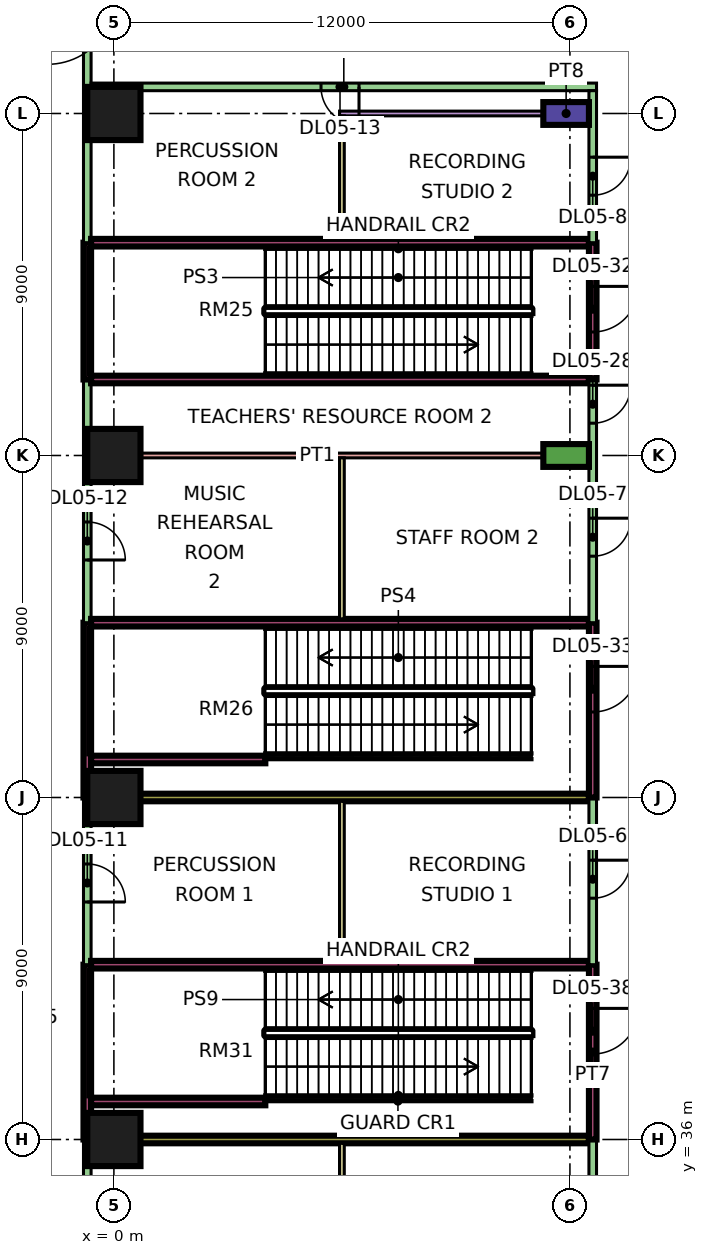
"""IFC4 building model, lengths in metres.
Left out: names, types, materials, properties, quantities, classifications, styles, units other than length and angle.
Written with IfcOpenShell. Run it as: python <this file> out.ifc"""

import sys

from ifc_helpers import new_model, si_unit, direction, frame, frame_2d, origin, origin_2d, place, context, subcontext, project, spatial, rectangle, extrude, element, fill, save


model = new_model("IFC4")
c1 = context("Model", 3, precision=1e-05, world=origin(), true_north=direction((0.0, 1.0)))
c2 = subcontext(c1, "Body", "Model", "MODEL_VIEW")
j1 = project(units=[si_unit("LENGTHUNIT", "METRE"), si_unit("PLANEANGLEUNIT", "RADIAN")], contexts=[c1])
p1 = place(None, origin())
s1 = spatial("IfcSite", under=j1, at=p1, CompositionType="ELEMENT")
p2 = place(p1, origin())
s2 = spatial("IfcBuilding", under=s1, at=p2, CompositionType="ELEMENT")
p3 = place(p2, frame((0.0, 0.0, 26.4)))
s3 = spatial("IfcBuildingStorey", under=s2, at=p3, CompositionType="ELEMENT", Elevation=26.4)
for number, where, z_axis, x_axis in (
    (1, (0.0, 36.0, 0.0), (0.0, 0.0, 1.0), (1.0, 0.0, 0.0)),
    (2, (0.0, 45.0, 0.0), (0.0, 0.0, 1.0), (1.0, 0.0, 0.0)),
    (3, (0.0, 54.0, 0.0), (0.0, 0.0, 1.0), (1.0, 0.0, 0.0)),
    (4, (0.0, 63.0, 0.0), (0.0, 0.0, 1.0), (1.0, 0.0, 0.0)),
):
    element("IfcColumn", number, at=place(p3, frame(where, z_axis=z_axis, x_axis=x_axis)), inside=s3, PredefinedType="COLUMN", context=c2, shape_type="SweptSolid", body=[
        extrude(rectangle(XDim=1.4, YDim=1.4, at=origin_2d()), origin(), (0.0, 0.0, 1.0), 9.0),
    ])
p4 = place(p3, frame((-1.361, 66.482, 0.0), z_axis=(0.0, 0.0, 1.0), x_axis=(-0.707106781187, -0.707106781187, 0.0)))
e5 = element("IfcWall", 5, at=p4, inside=s3, PredefinedType="SOLIDWALL", context=c2, shape_type="SweptSolid", body=[
    extrude(rectangle(XDim=3.0, YDim=0.15, at=frame_2d((1.5, 0.0))), origin(), (0.0, 0.0, 1.0), 8.45),
])
p5 = place(p4, frame((0.55, 0.0, 0.0)))
e6 = element("IfcOpeningElement", 6, at=p5, cuts=e5, PredefinedType="OPENING", context=c2, shape_type="SweptSolid", body=[
    extrude(rectangle(XDim=1.8, YDim=2.4, at=frame_2d((0.9, 1.2))), frame((0.0, 0.085, 0.0), z_axis=(0.0, -1.0, 0.0), x_axis=(1.0, 0.0, 0.0)), (0.0, 0.0, 1.0), 0.17),
])
p6 = place(p3, frame((-5.7, 63.24, 0.0), z_axis=(0.0, 0.0, 1.0), x_axis=(0.707106781187, 0.707106781187, 0.0)))
e7 = element("IfcWall", 7, at=p6, inside=s3, PredefinedType="PARAPET", context=c2, shape_type="SweptSolid", body=[
    extrude(rectangle(XDim=7.722, YDim=0.2, at=frame_2d((3.861, 0.0))), origin(), (0.0, 0.0, 1.0), 0.5),
])
p7 = place(p3, frame((-0.7, 29.6, 0.0), z_axis=(0.0, 0.0, 1.0), x_axis=(0.0, 1.0, 0.0)))
e8 = element("IfcWall", 8, at=p7, inside=s3, PredefinedType="PARTITIONING", context=c2, shape_type="SweptSolid", body=[
    extrude(rectangle(XDim=6.4, YDim=0.2, at=frame_2d((3.2, 0.0))), origin(), (0.0, 0.0, 1.0), 8.45),
])
p8 = place(p7, frame((2.65, 0.0, 0.0)))
e9 = element("IfcOpeningElement", 9, at=p8, cuts=e8, PredefinedType="OPENING", context=c2, shape_type="SweptSolid", body=[
    extrude(rectangle(XDim=1.0, YDim=2.1, at=frame_2d((0.5, 1.05))), frame((0.0, 0.11, 0.0), z_axis=(0.0, -1.0, 0.0), x_axis=(1.0, 0.0, 0.0)), (0.0, 0.0, 1.0), 0.22),
])
p9 = place(p3, frame((-0.7, 36.0, 0.0), z_axis=(0.0, 0.0, 1.0), x_axis=(0.0, 1.0, 0.0)))
e10 = element("IfcWall", 10, at=p9, inside=s3, PredefinedType="SOLIDWALL", context=c2, shape_type="SweptSolid", body=[
    extrude(rectangle(XDim=4.6, YDim=0.2, at=frame_2d((2.3, 0.0))), origin(), (0.0, 0.0, 1.0), 8.45),
])
p10 = place(p3, frame((-0.7, 40.6, 0.0), z_axis=(0.0, 0.0, 1.0), x_axis=(0.0, 1.0, 0.0)))
e11 = element("IfcWall", 11, at=p10, inside=s3, PredefinedType="PARTITIONING", context=c2, shape_type="SweptSolid", body=[
    extrude(rectangle(XDim=4.4, YDim=0.2, at=frame_2d((2.2, 0.0))), origin(), (0.0, 0.0, 1.0), 8.45),
])
p11 = place(p10, frame((1.65, 0.0, 0.0)))
e12 = element("IfcOpeningElement", 12, at=p11, cuts=e11, PredefinedType="OPENING", context=c2, shape_type="SweptSolid", body=[
    extrude(rectangle(XDim=1.0, YDim=2.1, at=frame_2d((0.5, 1.05))), frame((0.0, 0.11, 0.0), z_axis=(0.0, -1.0, 0.0), x_axis=(1.0, 0.0, 0.0)), (0.0, 0.0, 1.0), 0.22),
])
p12 = place(p3, frame((-0.7, 45.0, 0.0), z_axis=(0.0, 0.0, 1.0), x_axis=(0.0, 1.0, 0.0)))
e13 = element("IfcWall", 13, at=p12, inside=s3, PredefinedType="SOLIDWALL", context=c2, shape_type="SweptSolid", body=[
    extrude(rectangle(XDim=4.6, YDim=0.2, at=frame_2d((2.3, 0.0))), origin(), (0.0, 0.0, 1.0), 8.45),
])
p13 = place(p3, frame((-0.7, 49.6, 0.0), z_axis=(0.0, 0.0, 1.0), x_axis=(0.0, 1.0, 0.0)))
e14 = element("IfcWall", 14, at=p13, inside=s3, PredefinedType="PARTITIONING", context=c2, shape_type="SweptSolid", body=[
    extrude(rectangle(XDim=6.4, YDim=0.2, at=frame_2d((3.2, 0.0))), origin(), (0.0, 0.0, 1.0), 8.45),
])
p14 = place(p13, frame((1.65, 0.0, 0.0)))
e15 = element("IfcOpeningElement", 15, at=p14, cuts=e14, PredefinedType="OPENING", context=c2, shape_type="SweptSolid", body=[
    extrude(rectangle(XDim=1.0, YDim=2.1, at=frame_2d((0.5, 1.05))), frame((0.0, 0.11, 0.0), z_axis=(0.0, -1.0, 0.0), x_axis=(1.0, 0.0, 0.0)), (0.0, 0.0, 1.0), 0.22),
])
p15 = place(p3, frame((-0.7, 56.0, 0.0), z_axis=(0.0, 0.0, 1.0), x_axis=(0.0, 1.0, 0.0)))
e16 = element("IfcWall", 16, at=p15, inside=s3, PredefinedType="SOLIDWALL", context=c2, shape_type="SweptSolid", body=[
    extrude(rectangle(XDim=3.6, YDim=0.2, at=frame_2d((1.8, 0.0))), origin(), (0.0, 0.0, 1.0), 8.45),
])
p16 = place(p3, frame((-0.7, 59.6, 0.0), z_axis=(0.0, 0.0, 1.0), x_axis=(0.0, 1.0, 0.0)))
e17 = element("IfcWall", 17, at=p16, inside=s3, PredefinedType="PARTITIONING", context=c2, shape_type="SweptSolid", body=[
    extrude(rectangle(XDim=6.4, YDim=0.2, at=frame_2d((3.2, 0.0))), origin(), (0.0, 0.0, 1.0), 8.45),
])
p17 = place(p3, frame((-0.6, 36.0, 0.0), z_axis=(0.0, 0.0, 1.0), x_axis=(1.0, 0.0, 0.0)))
e18 = element("IfcWall", 18, at=p17, inside=s3, PredefinedType="SOLIDWALL", context=c2, shape_type="SweptSolid", body=[
    extrude(rectangle(XDim=13.1, YDim=0.2, at=frame_2d((6.55, 0.0))), origin(), (0.0, 0.0, 1.0), 6.55),
])
p18 = place(p3, frame((-0.6, 40.6, 0.0), z_axis=(0.0, 0.0, 1.0), x_axis=(1.0, 0.0, 0.0)))
e19 = element("IfcWall", 19, at=p18, inside=s3, PredefinedType="SOLIDWALL", context=c2, shape_type="SweptSolid", body=[
    extrude(rectangle(XDim=13.1, YDim=0.2, at=frame_2d((6.55, 0.0))), origin(), (0.0, 0.0, 1.0), 8.45),
])
p19 = place(p3, frame((-0.6, 45.0, 0.0), z_axis=(0.0, 0.0, 1.0), x_axis=(1.0, 0.0, 0.0)))
e20 = element("IfcWall", 20, at=p19, inside=s3, PredefinedType="SOLIDWALL", context=c2, shape_type="SweptSolid", body=[
    extrude(rectangle(XDim=13.1, YDim=0.2, at=frame_2d((6.55, 0.0))), origin(), (0.0, 0.0, 1.0), 6.55),
])
p20 = place(p3, frame((-0.6, 49.6, 0.0), z_axis=(0.0, 0.0, 1.0), x_axis=(1.0, 0.0, 0.0)))
e21 = element("IfcWall", 21, at=p20, inside=s3, PredefinedType="SOLIDWALL", context=c2, shape_type="SweptSolid", body=[
    extrude(rectangle(XDim=13.1, YDim=0.2, at=frame_2d((6.55, 0.0))), origin(), (0.0, 0.0, 1.0), 8.45),
])
p21 = place(p3, frame((-0.6, 54.0, 0.0), z_axis=(0.0, 0.0, 1.0), x_axis=(1.0, 0.0, 0.0)))
e22 = element("IfcWall", 22, at=p21, inside=s3, PredefinedType="PARTITIONING", context=c2, shape_type="SweptSolid", body=[
    extrude(rectangle(XDim=11.9, YDim=0.125, at=frame_2d((5.95, 0.0))), origin(), (0.0, 0.0, 1.0), 6.55),
])
for number, where, z_axis, x_axis in (
    (23, (-0.6, 56.0, 0.0), (0.0, 0.0, 1.0), (1.0, 0.0, 0.0)),
    (24, (-0.6, 59.6, 0.0), (0.0, 0.0, 1.0), (1.0, 0.0, 0.0)),
):
    element("IfcWall", number, at=place(p3, frame(where, z_axis=z_axis, x_axis=x_axis)), inside=s3, PredefinedType="SOLIDWALL", context=c2, shape_type="SweptSolid", body=[
        extrude(rectangle(XDim=13.1, YDim=0.2, at=frame_2d((6.55, 0.0))), origin(), (0.0, 0.0, 1.0), 8.45),
    ])
p22 = place(p3, frame((-0.6, 63.7, 0.0), z_axis=(0.0, 0.0, 1.0), x_axis=(1.0, 0.0, 0.0)))
e25 = element("IfcWall", 25, at=p22, inside=s3, PredefinedType="PARTITIONING", context=c2, shape_type="SweptSolid", body=[
    extrude(rectangle(XDim=13.3, YDim=0.2, at=frame_2d((6.65, 0.0))), origin(), (0.0, 0.0, 1.0), 8.45),
])
p23 = place(p22, frame((6.05, 0.0, 0.0)))
e26 = element("IfcOpeningElement", 26, at=p23, cuts=e25, PredefinedType="OPENING", context=c2, shape_type="SweptSolid", body=[
    extrude(rectangle(XDim=1.0, YDim=2.1, at=frame_2d((0.5, 1.05))), frame((0.0, 0.11, 0.0), z_axis=(0.0, -1.0, 0.0), x_axis=(1.0, 0.0, 0.0)), (0.0, 0.0, 1.0), 0.22),
])
p24 = place(p3, frame((5.938, 63.0, 0.0), z_axis=(0.0, 0.0, 1.0), x_axis=(1.0, 0.0, 0.0)))
e27 = element("IfcWall", 27, at=p24, inside=s3, PredefinedType="PARTITIONING", context=c2, shape_type="SweptSolid", body=[
    extrude(rectangle(XDim=5.362, YDim=0.125, at=frame_2d((2.681, 0.0))), origin(), (0.0, 0.0, 1.0), 6.95),
])
p25 = place(p3, frame((6.0, 29.7, 0.0), z_axis=(0.0, 0.0, 1.0), x_axis=(0.0, 1.0, 0.0)))
e28 = element("IfcWall", 28, at=p25, inside=s3, PredefinedType="PARTITIONING", context=c2, shape_type="SweptSolid", body=[
    extrude(rectangle(XDim=6.2, YDim=0.125, at=frame_2d((3.1, 0.0))), origin(), (0.0, 0.0, 1.0), 8.45),
])
p26 = place(p3, frame((6.0, 40.7, 0.0), z_axis=(0.0, 0.0, 1.0), x_axis=(0.0, 1.0, 0.0)))
e29 = element("IfcWall", 29, at=p26, inside=s3, PredefinedType="PARTITIONING", context=c2, shape_type="SweptSolid", body=[
    extrude(rectangle(XDim=4.2, YDim=0.125, at=frame_2d((2.1, 0.0))), origin(), (0.0, 0.0, 1.0), 8.45),
])
p27 = place(p3, frame((6.0, 49.7, 0.0), z_axis=(0.0, 0.0, 1.0), x_axis=(0.0, 1.0, 0.0)))
e30 = element("IfcWall", 30, at=p27, inside=s3, PredefinedType="PARTITIONING", context=c2, shape_type="SweptSolid", body=[
    extrude(rectangle(XDim=4.238, YDim=0.125, at=frame_2d((2.119, 0.0))), origin(), (0.0, 0.0, 1.0), 8.45),
])
p28 = place(p3, frame((6.0, 59.7, 0.0), z_axis=(0.0, 0.0, 1.0), x_axis=(0.0, 1.0, 0.0)))
e31 = element("IfcWall", 31, at=p28, inside=s3, PredefinedType="PARTITIONING", context=c2, shape_type="SweptSolid", body=[
    extrude(rectangle(XDim=3.238, YDim=0.125, at=frame_2d((1.619, 0.0))), origin(), (0.0, 0.0, 1.0), 8.45),
])
p29 = place(p3, frame((12.6, 29.6, 0.0), z_axis=(0.0, 0.0, 1.0), x_axis=(0.0, 1.0, 0.0)))
e32 = element("IfcWall", 32, at=p29, inside=s3, PredefinedType="PARTITIONING", context=c2, shape_type="SweptSolid", body=[
    extrude(rectangle(XDim=6.4, YDim=0.2, at=frame_2d((3.2, 0.0))), origin(), (0.0, 0.0, 1.0), 8.45),
])
p30 = place(p29, frame((2.75, 0.0, 0.0)))
e33 = element("IfcOpeningElement", 33, at=p30, cuts=e32, PredefinedType="OPENING", context=c2, shape_type="SweptSolid", body=[
    extrude(rectangle(XDim=1.0, YDim=2.1, at=frame_2d((0.5, 1.05))), frame((0.0, 0.11, 0.0), z_axis=(0.0, -1.0, 0.0), x_axis=(1.0, 0.0, 0.0)), (0.0, 0.0, 1.0), 0.22),
])
p31 = place(p3, frame((12.6, 36.0, 0.0), z_axis=(0.0, 0.0, 1.0), x_axis=(0.0, 1.0, 0.0)))
e34 = element("IfcWall", 34, at=p31, inside=s3, PredefinedType="SOLIDWALL", context=c2, shape_type="SweptSolid", body=[
    extrude(rectangle(XDim=4.6, YDim=0.2, at=frame_2d((2.3, 0.0))), origin(), (0.0, 0.0, 1.0), 8.45),
])
p32 = place(p31, frame((2.25, 0.0, 0.0)))
e35 = element("IfcOpeningElement", 35, at=p32, cuts=e34, PredefinedType="OPENING", context=c2, shape_type="SweptSolid", body=[
    extrude(rectangle(XDim=1.2, YDim=2.1, at=frame_2d((0.6, 1.05))), frame((0.0, 0.11, 0.0), z_axis=(0.0, -1.0, 0.0), x_axis=(1.0, 0.0, 0.0)), (0.0, 0.0, 1.0), 0.22),
])
p33 = place(p3, frame((12.6, 40.6, 0.0), z_axis=(0.0, 0.0, 1.0), x_axis=(0.0, 1.0, 0.0)))
e36 = element("IfcWall", 36, at=p33, inside=s3, PredefinedType="PARTITIONING", context=c2, shape_type="SweptSolid", body=[
    extrude(rectangle(XDim=4.4, YDim=0.2, at=frame_2d((2.2, 0.0))), origin(), (0.0, 0.0, 1.0), 8.45),
])
p34 = place(p33, frame((1.75, 0.0, 0.0)))
e37 = element("IfcOpeningElement", 37, at=p34, cuts=e36, PredefinedType="OPENING", context=c2, shape_type="SweptSolid", body=[
    extrude(rectangle(XDim=1.0, YDim=2.1, at=frame_2d((0.5, 1.05))), frame((0.0, 0.11, 0.0), z_axis=(0.0, -1.0, 0.0), x_axis=(1.0, 0.0, 0.0)), (0.0, 0.0, 1.0), 0.22),
])
p35 = place(p3, frame((12.6, 45.0, 0.0), z_axis=(0.0, 0.0, 1.0), x_axis=(0.0, 1.0, 0.0)))
e38 = element("IfcWall", 38, at=p35, inside=s3, PredefinedType="SOLIDWALL", context=c2, shape_type="SweptSolid", body=[
    extrude(rectangle(XDim=4.6, YDim=0.2, at=frame_2d((2.3, 0.0))), origin(), (0.0, 0.0, 1.0), 8.45),
])
p36 = place(p35, frame((2.25, 0.0, 0.0)))
e39 = element("IfcOpeningElement", 39, at=p36, cuts=e38, PredefinedType="OPENING", context=c2, shape_type="SweptSolid", body=[
    extrude(rectangle(XDim=1.2, YDim=2.1, at=frame_2d((0.6, 1.05))), frame((0.0, 0.11, 0.0), z_axis=(0.0, -1.0, 0.0), x_axis=(1.0, 0.0, 0.0)), (0.0, 0.0, 1.0), 0.22),
])
p37 = place(p3, frame((12.6, 49.6, 0.0), z_axis=(0.0, 0.0, 1.0), x_axis=(0.0, 1.0, 0.0)))
e40 = element("IfcWall", 40, at=p37, inside=s3, PredefinedType="PARTITIONING", context=c2, shape_type="SweptSolid", body=[
    extrude(rectangle(XDim=6.4, YDim=0.2, at=frame_2d((3.2, 0.0))), origin(), (0.0, 0.0, 1.0), 8.45),
])
p38 = place(p37, frame((1.75, 0.0, 0.0)))
e41 = element("IfcOpeningElement", 41, at=p38, cuts=e40, PredefinedType="OPENING", context=c2, shape_type="SweptSolid", body=[
    extrude(rectangle(XDim=1.0, YDim=2.1, at=frame_2d((0.5, 1.05))), frame((0.0, 0.11, 0.0), z_axis=(0.0, -1.0, 0.0), x_axis=(1.0, 0.0, 0.0)), (0.0, 0.0, 1.0), 0.22),
])
p39 = place(p37, frame((5.25, 0.0, 0.0)))
e42 = element("IfcOpeningElement", 42, at=p39, cuts=e40, PredefinedType="OPENING", context=c2, shape_type="SweptSolid", body=[
    extrude(rectangle(XDim=1.0, YDim=2.1, at=frame_2d((0.5, 1.05))), frame((0.0, 0.11, 0.0), z_axis=(0.0, -1.0, 0.0), x_axis=(1.0, 0.0, 0.0)), (0.0, 0.0, 1.0), 0.22),
])
p40 = place(p3, frame((12.6, 56.0, 0.0), z_axis=(0.0, 0.0, 1.0), x_axis=(0.0, 1.0, 0.0)))
e43 = element("IfcWall", 43, at=p40, inside=s3, PredefinedType="SOLIDWALL", context=c2, shape_type="SweptSolid", body=[
    extrude(rectangle(XDim=3.6, YDim=0.2, at=frame_2d((1.8, 0.0))), origin(), (0.0, 0.0, 1.0), 8.45),
])
p41 = place(p40, frame((1.25, 0.0, 0.0)))
e44 = element("IfcOpeningElement", 44, at=p41, cuts=e43, PredefinedType="OPENING", context=c2, shape_type="SweptSolid", body=[
    extrude(rectangle(XDim=1.2, YDim=2.1, at=frame_2d((0.6, 1.05))), frame((0.0, 0.11, 0.0), z_axis=(0.0, -1.0, 0.0), x_axis=(1.0, 0.0, 0.0)), (0.0, 0.0, 1.0), 0.22),
])
p42 = place(p3, frame((12.6, 59.6, 0.0), z_axis=(0.0, 0.0, 1.0), x_axis=(0.0, 1.0, 0.0)))
e45 = element("IfcWall", 45, at=p42, inside=s3, PredefinedType="PARTITIONING", context=c2, shape_type="SweptSolid", body=[
    extrude(rectangle(XDim=4.0, YDim=0.2, at=frame_2d((2.0, 0.0))), origin(), (0.0, 0.0, 1.0), 8.45),
])
p43 = place(p42, frame((1.25, 0.0, 0.0)))
e46 = element("IfcOpeningElement", 46, at=p43, cuts=e45, PredefinedType="OPENING", context=c2, shape_type="SweptSolid", body=[
    extrude(rectangle(XDim=1.0, YDim=2.1, at=frame_2d((0.5, 1.05))), frame((0.0, 0.11, 0.0), z_axis=(0.0, -1.0, 0.0), x_axis=(1.0, 0.0, 0.0)), (0.0, 0.0, 1.0), 0.22),
])
p44 = place(p3, frame((11.3, 54.0, 0.0), z_axis=(0.0, 0.0, 1.0), x_axis=(1.0, 0.0, 0.0)))
e47 = element("IfcWall", 47, at=p44, inside=s3, PredefinedType="SOLIDWALL", context=c2, shape_type="SweptSolid", body=[
    extrude(rectangle(XDim=1.2, YDim=0.6, at=frame_2d((0.6, 0.0))), origin(), (0.0, 0.0, 1.0), 6.55),
])
p45 = place(p3, frame((11.3, 63.0, 0.0), z_axis=(0.0, 0.0, 1.0), x_axis=(1.0, 0.0, 0.0)))
e48 = element("IfcWall", 48, at=p45, inside=s3, PredefinedType="SOLIDWALL", context=c2, shape_type="SweptSolid", body=[
    extrude(rectangle(XDim=1.2, YDim=0.6, at=frame_2d((0.6, 0.0))), origin(), (0.0, 0.0, 1.0), 6.95),
])
for number, where, z_axis, x_axis in (
    (49, (-0.6, 46.0, 0.0), (0.0, 0.0, 1.0), (1.0, 0.0, 0.0)),
    (50, (-0.6, 37.0, 0.0), (0.0, 0.0, 1.0), (1.0, 0.0, 0.0)),
):
    element("IfcWall", number, at=place(p3, frame(where, z_axis=z_axis, x_axis=x_axis)), inside=s3, PredefinedType="SOLIDWALL", context=c2, shape_type="SweptSolid", body=[
        extrude(rectangle(XDim=4.585, YDim=0.2, at=frame_2d((2.292, 0.0))), origin(), (0.0, 0.0, 1.0), 8.45),
    ])
p46 = place(p34, origin())
e51 = element("IfcDoor", 51, at=p46, inside=s3, OperationType="SINGLE_SWING_RIGHT", PredefinedType="DOOR", context=c2, shape_type="SweptSolid", body=[
    extrude(rectangle(XDim=1.0, YDim=2.1, at=frame_2d((0.5, 1.05))), frame((0.0, 0.025, 0.0), z_axis=(0.0, -1.0, 0.0), x_axis=(1.0, 0.0, 0.0)), (0.0, 0.0, 1.0), 0.05),
])
fill(e37, e51)
p47 = place(p38, origin())
e52 = element("IfcDoor", 52, at=p47, inside=s3, OperationType="SINGLE_SWING_RIGHT", PredefinedType="DOOR", context=c2, shape_type="SweptSolid", body=[
    extrude(rectangle(XDim=1.0, YDim=2.1, at=frame_2d((0.5, 1.05))), frame((0.0, 0.025, 0.0), z_axis=(0.0, -1.0, 0.0), x_axis=(1.0, 0.0, 0.0)), (0.0, 0.0, 1.0), 0.05),
])
fill(e41, e52)
p48 = place(p43, origin())
e53 = element("IfcDoor", 53, at=p48, inside=s3, OperationType="SINGLE_SWING_RIGHT", PredefinedType="DOOR", context=c2, shape_type="SweptSolid", body=[
    extrude(rectangle(XDim=1.0, YDim=2.1, at=frame_2d((0.5, 1.05))), frame((0.0, 0.025, 0.0), z_axis=(0.0, -1.0, 0.0), x_axis=(1.0, 0.0, 0.0)), (0.0, 0.0, 1.0), 0.05),
])
fill(e46, e53)
p49 = place(p11, frame((1.0, 0.0, 0.0), z_axis=(0.0, 0.0, 1.0), x_axis=(-1.0, 0.0, 0.0)))
e54 = element("IfcDoor", 54, at=p49, inside=s3, OperationType="SINGLE_SWING_LEFT", PredefinedType="DOOR", context=c2, shape_type="SweptSolid", body=[
    extrude(rectangle(XDim=1.0, YDim=2.1, at=frame_2d((0.5, 1.05))), frame((0.0, 0.025, 0.0), z_axis=(0.0, -1.0, 0.0), x_axis=(1.0, 0.0, 0.0)), (0.0, 0.0, 1.0), 0.05),
])
fill(e12, e54)
p50 = place(p14, frame((1.0, 0.0, 0.0), z_axis=(0.0, 0.0, 1.0), x_axis=(-1.0, 0.0, 0.0)))
e55 = element("IfcDoor", 55, at=p50, inside=s3, OperationType="SINGLE_SWING_LEFT", PredefinedType="DOOR", context=c2, shape_type="SweptSolid", body=[
    extrude(rectangle(XDim=1.0, YDim=2.1, at=frame_2d((0.5, 1.05))), frame((0.0, 0.025, 0.0), z_axis=(0.0, -1.0, 0.0), x_axis=(1.0, 0.0, 0.0)), (0.0, 0.0, 1.0), 0.05),
])
fill(e15, e55)
p51 = place(p23, origin())
e56 = element("IfcDoor", 56, at=p51, inside=s3, OperationType="SINGLE_SWING_RIGHT", PredefinedType="DOOR", context=c2, shape_type="SweptSolid", body=[
    extrude(rectangle(XDim=1.0, YDim=2.1, at=frame_2d((0.5, 1.05))), frame((0.0, 0.025, 0.0), z_axis=(0.0, -1.0, 0.0), x_axis=(1.0, 0.0, 0.0)), (0.0, 0.0, 1.0), 0.05),
])
fill(e26, e56)
p52 = place(p39, origin())
e57 = element("IfcDoor", 57, at=p52, inside=s3, OperationType="SINGLE_SWING_RIGHT", PredefinedType="DOOR", context=c2, shape_type="SweptSolid", body=[
    extrude(rectangle(XDim=1.0, YDim=2.1, at=frame_2d((0.5, 1.05))), frame((0.0, 0.025, 0.0), z_axis=(0.0, -1.0, 0.0), x_axis=(1.0, 0.0, 0.0)), (0.0, 0.0, 1.0), 0.05),
])
fill(e42, e57)
p53 = place(p41, origin())
e58 = element("IfcDoor", 58, at=p53, inside=s3, OperationType="SINGLE_SWING_RIGHT", PredefinedType="DOOR", context=c2, shape_type="SweptSolid", body=[
    extrude(rectangle(XDim=1.2, YDim=2.1, at=frame_2d((0.6, 1.05))), frame((0.0, 0.025, 0.0), z_axis=(0.0, -1.0, 0.0), x_axis=(1.0, 0.0, 0.0)), (0.0, 0.0, 1.0), 0.05),
])
fill(e44, e58)
p54 = place(p36, origin())
e59 = element("IfcDoor", 59, at=p54, inside=s3, OperationType="SINGLE_SWING_RIGHT", PredefinedType="DOOR", context=c2, shape_type="SweptSolid", body=[
    extrude(rectangle(XDim=1.2, YDim=2.1, at=frame_2d((0.6, 1.05))), frame((0.0, 0.025, 0.0), z_axis=(0.0, -1.0, 0.0), x_axis=(1.0, 0.0, 0.0)), (0.0, 0.0, 1.0), 0.05),
])
fill(e39, e59)
p55 = place(p32, origin())
e60 = element("IfcDoor", 60, at=p55, inside=s3, OperationType="SINGLE_SWING_RIGHT", PredefinedType="DOOR", context=c2, shape_type="SweptSolid", body=[
    extrude(rectangle(XDim=1.2, YDim=2.1, at=frame_2d((0.6, 1.05))), frame((0.0, 0.025, 0.0), z_axis=(0.0, -1.0, 0.0), x_axis=(1.0, 0.0, 0.0)), (0.0, 0.0, 1.0), 0.05),
])
fill(e35, e60)
save(model, sys.argv[1])
